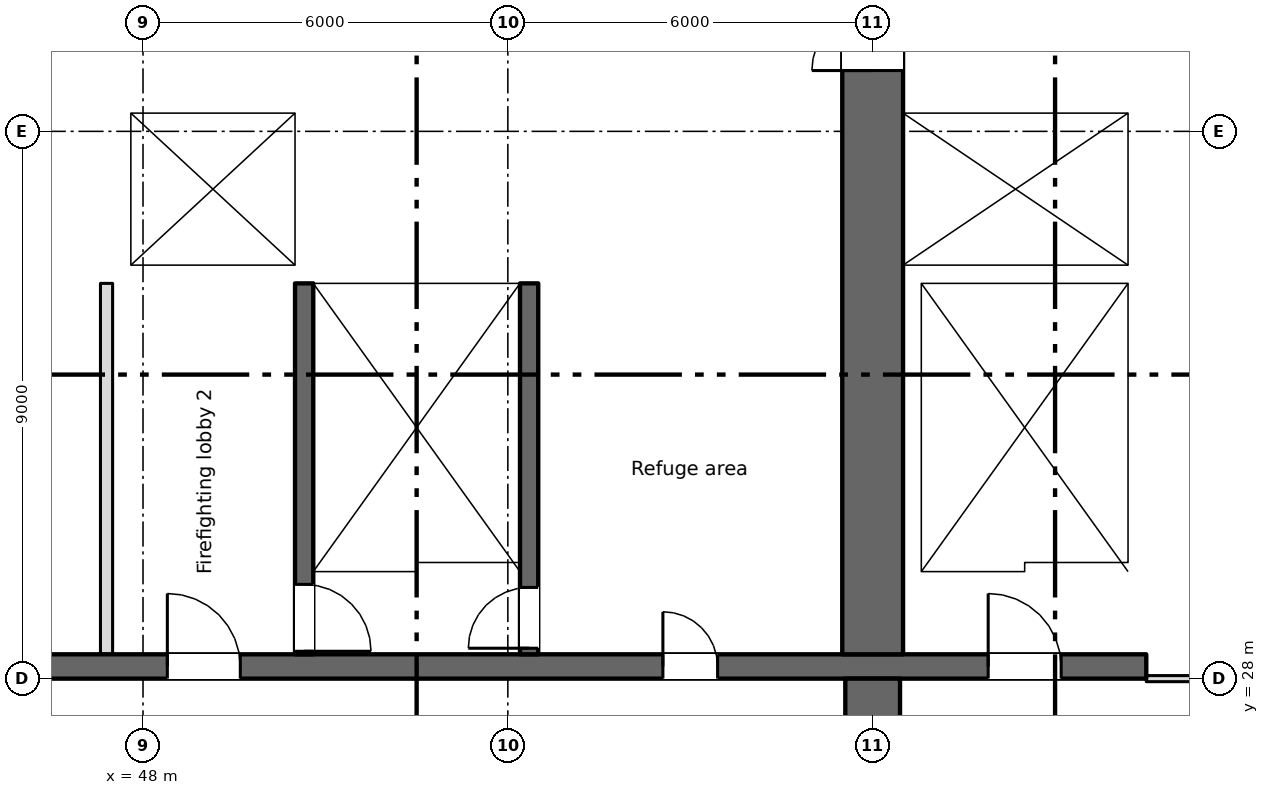
"""IFC4 building model, lengths in metres.
Left out: names, types, materials, properties, quantities, classifications, styles, units other than length and angle.
Written with IfcOpenShell. Run it as: python <this file> out.ifc"""

import sys

from ifc_helpers import new_model, si_unit, direction, frame, frame_2d, origin, place, context, subcontext, project, spatial, rectangle, extrude, element, fill, save


model = new_model("IFC4")
c1 = context("Model", 3, precision=1e-05, world=origin(), true_north=direction((0.0, 1.0)))
c2 = subcontext(c1, "Body", "Model", "MODEL_VIEW")
j1 = project(units=[si_unit("LENGTHUNIT", "METRE"), si_unit("PLANEANGLEUNIT", "RADIAN")], contexts=[c1])
p1 = place(None, origin())
s1 = spatial("IfcSite", under=j1, at=p1, CompositionType="ELEMENT")
p2 = place(p1, origin())
s2 = spatial("IfcBuilding", under=s1, at=p2, CompositionType="ELEMENT")
p3 = place(p2, frame((0.0, 0.0, 90.0)))
s3 = spatial("IfcBuildingStorey", under=s2, at=p3, CompositionType="ELEMENT", Elevation=90.0)
p4 = place(p3, frame((60.0, 1.4, 0.0), z_axis=(0.0, 0.0, 1.0), x_axis=(0.0, 1.0, 0.0)))
e1 = element("IfcWall", 1, at=p4, inside=s3, PredefinedType="SHEAR", context=c2, shape_type="SweptSolid", body=[
    extrude(rectangle(XDim=26.6, YDim=0.9, at=frame_2d((13.3, 0.0))), origin(), (0.0, 0.0, 1.0), 4.2),
])
p5 = place(p4, frame((24.5, 0.0, 0.0)))
e2 = element("IfcOpeningElement", 2, at=p5, cuts=e1, PredefinedType="OPENING", context=c2, shape_type="SweptSolid", body=[
    extrude(rectangle(XDim=1.2, YDim=2.1, at=frame_2d((0.6, 1.05))), frame((0.0, 0.46, 0.0), z_axis=(0.0, -1.0, 0.0), x_axis=(1.0, 0.0, 0.0)), (0.0, 0.0, 1.0), 0.92),
])
p6 = place(p3, frame((6.7, 28.2, 0.0), z_axis=(0.0, 0.0, 1.0), x_axis=(1.0, 0.0, 0.0)))
e3 = element("IfcWall", 3, at=p6, inside=s3, PredefinedType="SHEAR", context=c2, shape_type="SweptSolid", body=[
    extrude(rectangle(XDim=57.8, YDim=0.4, at=frame_2d((28.9, 0.0))), origin(), (0.0, 0.0, 1.0), 4.2),
])
p7 = place(p6, frame((13.85, 0.0, 0.0)))
e4 = element("IfcOpeningElement", 4, at=p7, cuts=e3, PredefinedType="OPENING", context=c2, shape_type="SweptSolid", body=[
    extrude(rectangle(XDim=0.9, YDim=2.1, at=frame_2d((0.45, 1.05))), frame((0.0, 0.21, 0.0), z_axis=(0.0, -1.0, 0.0), x_axis=(1.0, 0.0, 0.0)), (0.0, 0.0, 1.0), 0.42),
])
p8 = place(p6, frame((49.85, 0.0, 0.0)))
e5 = element("IfcOpeningElement", 5, at=p8, cuts=e3, PredefinedType="OPENING", context=c2, shape_type="SweptSolid", body=[
    extrude(rectangle(XDim=0.9, YDim=2.1, at=frame_2d((0.45, 1.05))), frame((0.0, 0.21, 0.0), z_axis=(0.0, -1.0, 0.0), x_axis=(1.0, 0.0, 0.0)), (0.0, 0.0, 1.0), 0.42),
])
p9 = place(p6, frame((1.35, 0.0, 0.0)))
e6 = element("IfcOpeningElement", 6, at=p9, cuts=e3, PredefinedType="OPENING", context=c2, shape_type="SweptSolid", body=[
    extrude(rectangle(XDim=0.9, YDim=2.1, at=frame_2d((0.45, 1.05))), frame((0.0, 0.21, 0.0), z_axis=(0.0, -1.0, 0.0), x_axis=(1.0, 0.0, 0.0)), (0.0, 0.0, 1.0), 0.42),
])
p10 = place(p6, frame((4.7, 0.0, 0.0)))
e7 = element("IfcOpeningElement", 7, at=p10, cuts=e3, PredefinedType="OPENING", context=c2, shape_type="SweptSolid", body=[
    extrude(rectangle(XDim=1.2, YDim=2.1, at=frame_2d((0.6, 1.05))), frame((0.0, 0.21, 0.0), z_axis=(0.0, -1.0, 0.0), x_axis=(1.0, 0.0, 0.0)), (0.0, 0.0, 1.0), 0.42),
])
p11 = place(p6, frame((31.7, 0.0, 0.0)))
e8 = element("IfcOpeningElement", 8, at=p11, cuts=e3, PredefinedType="OPENING", context=c2, shape_type="SweptSolid", body=[
    extrude(rectangle(XDim=1.2, YDim=2.1, at=frame_2d((0.6, 1.05))), frame((0.0, 0.21, 0.0), z_axis=(0.0, -1.0, 0.0), x_axis=(1.0, 0.0, 0.0)), (0.0, 0.0, 1.0), 0.42),
])
p12 = place(p6, frame((55.2, 0.0, 0.0)))
e9 = element("IfcOpeningElement", 9, at=p12, cuts=e3, PredefinedType="OPENING", context=c2, shape_type="SweptSolid", body=[
    extrude(rectangle(XDim=1.2, YDim=2.1, at=frame_2d((0.6, 1.05))), frame((0.0, 0.21, 0.0), z_axis=(0.0, -1.0, 0.0), x_axis=(1.0, 0.0, 0.0)), (0.0, 0.0, 1.0), 0.42),
])
p13 = place(p6, frame((21.7, 0.0, 0.0)))
e10 = element("IfcOpeningElement", 10, at=p13, cuts=e3, PredefinedType="OPENING", context=c2, shape_type="SweptSolid", body=[
    extrude(rectangle(XDim=1.2, YDim=2.1, at=frame_2d((0.6, 1.05))), frame((0.0, 0.21, 0.0), z_axis=(0.0, -1.0, 0.0), x_axis=(1.0, 0.0, 0.0)), (0.0, 0.0, 1.0), 0.42),
])
p14 = place(p6, frame((41.7, 0.0, 0.0)))
e11 = element("IfcOpeningElement", 11, at=p14, cuts=e3, PredefinedType="OPENING", context=c2, shape_type="SweptSolid", body=[
    extrude(rectangle(XDim=1.2, YDim=2.1, at=frame_2d((0.6, 1.05))), frame((0.0, 0.21, 0.0), z_axis=(0.0, -1.0, 0.0), x_axis=(1.0, 0.0, 0.0)), (0.0, 0.0, 1.0), 0.42),
])
p15 = place(p6, frame((24.85, 0.0, 0.0)))
e12 = element("IfcOpeningElement", 12, at=p15, cuts=e3, PredefinedType="OPENING", context=c2, shape_type="SweptSolid", body=[
    extrude(rectangle(XDim=2.4, YDim=2.1, at=frame_2d((1.2, 1.05))), frame((0.0, 0.21, 0.0), z_axis=(0.0, -1.0, 0.0), x_axis=(1.0, 0.0, 0.0)), (0.0, 0.0, 1.0), 0.42),
])
p16 = place(p6, frame((37.35, 0.0, 0.0)))
e13 = element("IfcOpeningElement", 13, at=p16, cuts=e3, PredefinedType="OPENING", context=c2, shape_type="SweptSolid", body=[
    extrude(rectangle(XDim=2.4, YDim=2.1, at=frame_2d((1.2, 1.05))), frame((0.0, 0.21, 0.0), z_axis=(0.0, -1.0, 0.0), x_axis=(1.0, 0.0, 0.0)), (0.0, 0.0, 1.0), 0.42),
])
p17 = place(p6, frame((7.85, 0.0, 0.0)))
e14 = element("IfcOpeningElement", 14, at=p17, cuts=e3, PredefinedType="OPENING", context=c2, shape_type="SweptSolid", body=[
    extrude(rectangle(XDim=2.4, YDim=2.1, at=frame_2d((1.2, 1.05))), frame((0.0, 0.21, 0.0), z_axis=(0.0, -1.0, 0.0), x_axis=(1.0, 0.0, 0.0)), (0.0, 0.0, 1.0), 0.42),
])
p18 = place(p6, frame((28.85, 0.0, 0.0)))
e15 = element("IfcOpeningElement", 15, at=p18, cuts=e3, PredefinedType="OPENING", context=c2, shape_type="SweptSolid", body=[
    extrude(rectangle(XDim=0.9, YDim=2.1, at=frame_2d((0.45, 1.05))), frame((0.0, 0.21, 0.0), z_axis=(0.0, -1.0, 0.0), x_axis=(1.0, 0.0, 0.0)), (0.0, 0.0, 1.0), 0.42),
])
p19 = place(p6, frame((34.85, 0.0, 0.0)))
e16 = element("IfcOpeningElement", 16, at=p19, cuts=e3, PredefinedType="OPENING", context=c2, shape_type="SweptSolid", body=[
    extrude(rectangle(XDim=0.9, YDim=2.1, at=frame_2d((0.45, 1.05))), frame((0.0, 0.21, 0.0), z_axis=(0.0, -1.0, 0.0), x_axis=(1.0, 0.0, 0.0)), (0.0, 0.0, 1.0), 0.42),
])
p20 = place(p3, frame((64.35, 34.8, 0.0), z_axis=(0.0, 0.0, 1.0), x_axis=(0.0, 1.0, 0.0)))
e17 = element("IfcWall", 17, at=p20, inside=s3, PredefinedType="SHEAR", context=c2, shape_type="SweptSolid", body=[
    extrude(rectangle(XDim=10.2, YDim=0.3, at=frame_2d((5.1, 0.0))), origin(), (0.0, 0.0, 1.0), 4.2),
])
p21 = place(p3, frame((60.0, 28.4, 0.0), z_axis=(0.0, 0.0, 1.0), x_axis=(0.0, 1.0, 0.0)))
e18 = element("IfcWall", 18, at=p21, inside=s3, PredefinedType="SHEAR", context=c2, shape_type="SweptSolid", body=[
    extrude(rectangle(XDim=16.6, YDim=1.0, at=frame_2d((8.3, 0.0))), origin(), (0.0, 0.0, 1.0), 4.2),
])
p22 = place(p21, frame((9.6, 0.0, 0.0)))
e19 = element("IfcOpeningElement", 19, at=p22, cuts=e18, PredefinedType="OPENING", context=c2, shape_type="SweptSolid", body=[
    extrude(rectangle(XDim=2.0, YDim=2.1, at=frame_2d((1.0, 1.05))), frame((0.0, 0.51, 0.0), z_axis=(0.0, -1.0, 0.0), x_axis=(1.0, 0.0, 0.0)), (0.0, 0.0, 1.0), 1.02),
])
p23 = place(p21, frame((15.25, 0.0, 0.0)))
e20 = element("IfcOpeningElement", 20, at=p23, cuts=e18, PredefinedType="OPENING", context=c2, shape_type="SweptSolid", body=[
    extrude(rectangle(XDim=1.2, YDim=2.1, at=frame_2d((0.6, 1.05))), frame((0.0, 0.51, 0.0), z_axis=(0.0, -1.0, 0.0), x_axis=(1.0, 0.0, 0.0)), (0.0, 0.0, 1.0), 1.02),
])
p24 = place(p3, frame((50.65, 34.5, 0.0), z_axis=(0.0, 0.0, 1.0), x_axis=(0.0, -1.0, 0.0)))
e21 = element("IfcWall", 21, at=p24, inside=s3, PredefinedType="SHEAR", context=c2, shape_type="SweptSolid", body=[
    extrude(rectangle(XDim=6.1, YDim=0.3, at=frame_2d((3.05, 0.0))), origin(), (0.0, 0.0, 1.0), 4.2),
])
p25 = place(p24, frame((4.95, 0.0, 0.0)))
e22 = element("IfcOpeningElement", 22, at=p25, cuts=e21, PredefinedType="OPENING", context=c2, shape_type="SweptSolid", body=[
    extrude(rectangle(XDim=1.1, YDim=2.1, at=frame_2d((0.55, 1.05))), frame((0.0, 0.16, 0.0), z_axis=(0.0, -1.0, 0.0), x_axis=(1.0, 0.0, 0.0)), (0.0, 0.0, 1.0), 0.32),
])
p26 = place(p3, frame((54.35, 28.4, 0.0), z_axis=(0.0, 0.0, 1.0), x_axis=(0.0, 1.0, 0.0)))
e23 = element("IfcWall", 23, at=p26, inside=s3, PredefinedType="SHEAR", context=c2, shape_type="SweptSolid", body=[
    extrude(rectangle(XDim=6.1, YDim=0.3, at=frame_2d((3.05, 0.0))), origin(), (0.0, 0.0, 1.0), 4.2),
])
p27 = place(p26, frame((0.1, 0.0, 0.0)))
e24 = element("IfcOpeningElement", 24, at=p27, cuts=e23, PredefinedType="OPENING", context=c2, shape_type="SweptSolid", body=[
    extrude(rectangle(XDim=1.0, YDim=2.1, at=frame_2d((0.5, 1.05))), frame((0.0, 0.16, 0.0), z_axis=(0.0, -1.0, 0.0), x_axis=(1.0, 0.0, 0.0)), (0.0, 0.0, 1.0), 0.32),
])
for number, where, z_axis, x_axis in (
    (25, (60.65, 28.4, 0.0), (0.0, 0.0, 1.0), (0.0, 1.0, 0.0)),
    (26, (64.35, 28.4, 0.0), (0.0, 0.0, 1.0), (0.0, 1.0, 0.0)),
):
    element("IfcWall", number, at=place(p3, frame(where, z_axis=z_axis, x_axis=x_axis)), inside=s3, PredefinedType="SHEAR", context=c2, shape_type="SweptSolid", body=[
        extrude(rectangle(XDim=6.1, YDim=0.3, at=frame_2d((3.05, 0.0))), origin(), (0.0, 0.0, 1.0), 4.2),
    ])
p28 = place(p3, frame((47.3, 34.65, 0.0), z_axis=(0.0, 0.0, 1.0), x_axis=(1.0, 0.0, 0.0)))
e27 = element("IfcWall", 27, at=p28, inside=s3, PredefinedType="SHEAR", context=c2, shape_type="SweptSolid", body=[
    extrude(rectangle(XDim=12.2, YDim=0.3, at=frame_2d((6.1, 0.0))), origin(), (0.0, 0.0, 1.0), 4.2),
])
p29 = place(p28, frame((1.3, 0.0, 0.0)))
e28 = element("IfcOpeningElement", 28, at=p29, cuts=e27, PredefinedType="OPENING", context=c2, shape_type="SweptSolid", body=[
    extrude(rectangle(XDim=1.1, YDim=2.1, at=frame_2d((0.55, 1.05))), frame((0.0, 0.16, 0.0), z_axis=(0.0, -1.0, 0.0), x_axis=(1.0, 0.0, 0.0)), (0.0, 0.0, 1.0), 0.32),
])
p30 = place(p3, frame((60.5, 34.65, 0.0), z_axis=(0.0, 0.0, 1.0), x_axis=(1.0, 0.0, 0.0)))
e29 = element("IfcWall", 29, at=p30, inside=s3, PredefinedType="SHEAR", context=c2, shape_type="SweptSolid", body=[
    extrude(rectangle(XDim=4.0, YDim=0.3, at=frame_2d((2.0, 0.0))), origin(), (0.0, 0.0, 1.0), 4.2),
])
p31 = place(p3, frame((47.3, 37.45, 0.0), z_axis=(0.0, 0.0, 1.0), x_axis=(1.0, 0.0, 0.0)))
e30 = element("IfcWall", 30, at=p31, inside=s3, PredefinedType="SHEAR", context=c2, shape_type="SweptSolid", body=[
    extrude(rectangle(XDim=12.2, YDim=0.3, at=frame_2d((6.1, 0.0))), origin(), (0.0, 0.0, 1.0), 4.2),
])
p32 = place(p31, frame((4.3, 0.0, 0.0)))
e31 = element("IfcOpeningElement", 31, at=p32, cuts=e30, PredefinedType="OPENING", context=c2, shape_type="SweptSolid", body=[
    extrude(rectangle(XDim=1.1, YDim=2.1, at=frame_2d((0.55, 1.05))), frame((0.0, 0.16, 0.0), z_axis=(0.0, -1.0, 0.0), x_axis=(1.0, 0.0, 0.0)), (0.0, 0.0, 1.0), 0.32),
])
p33 = place(p31, frame((7.3, 0.0, 0.0)))
e32 = element("IfcOpeningElement", 32, at=p33, cuts=e30, PredefinedType="OPENING", context=c2, shape_type="SweptSolid", body=[
    extrude(rectangle(XDim=1.1, YDim=2.1, at=frame_2d((0.55, 1.05))), frame((0.0, 0.16, 0.0), z_axis=(0.0, -1.0, 0.0), x_axis=(1.0, 0.0, 0.0)), (0.0, 0.0, 1.0), 0.32),
])
p34 = place(p31, frame((10.3, 0.0, 0.0)))
e33 = element("IfcOpeningElement", 33, at=p34, cuts=e30, PredefinedType="OPENING", context=c2, shape_type="SweptSolid", body=[
    extrude(rectangle(XDim=1.1, YDim=2.1, at=frame_2d((0.55, 1.05))), frame((0.0, 0.16, 0.0), z_axis=(0.0, -1.0, 0.0), x_axis=(1.0, 0.0, 0.0)), (0.0, 0.0, 1.0), 0.32),
])
p35 = place(p3, frame((60.5, 37.45, 0.0), z_axis=(0.0, 0.0, 1.0), x_axis=(1.0, 0.0, 0.0)))
e34 = element("IfcWall", 34, at=p35, inside=s3, PredefinedType="SHEAR", context=c2, shape_type="SweptSolid", body=[
    extrude(rectangle(XDim=3.7, YDim=0.3, at=frame_2d((1.85, 0.0))), origin(), (0.0, 0.0, 1.0), 4.2),
])
p36 = place(p35, frame((1.3, 0.0, 0.0)))
e35 = element("IfcOpeningElement", 35, at=p36, cuts=e34, PredefinedType="OPENING", context=c2, shape_type="SweptSolid", body=[
    extrude(rectangle(XDim=1.1, YDim=2.1, at=frame_2d((0.55, 1.05))), frame((0.0, 0.16, 0.0), z_axis=(0.0, -1.0, 0.0), x_axis=(1.0, 0.0, 0.0)), (0.0, 0.0, 1.0), 0.32),
])
p37 = place(p3, frame((47.55, 34.8, 0.0), z_axis=(0.0, 0.0, 1.0), x_axis=(0.0, 1.0, 0.0)))
e36 = element("IfcWall", 36, at=p37, inside=s3, PredefinedType="SHEAR", context=c2, shape_type="SweptSolid", body=[
    extrude(rectangle(XDim=2.5, YDim=0.5, at=frame_2d((1.25, 0.0))), origin(), (0.0, 0.0, 1.0), 4.2),
])
for number, where, z_axis, x_axis in (
    (37, (50.65, 34.8, 0.0), (0.0, 0.0, 1.0), (0.0, 1.0, 0.0)),
    (38, (53.65, 34.8, 0.0), (0.0, 0.0, 1.0), (0.0, 1.0, 0.0)),
    (39, (56.65, 34.8, 0.0), (0.0, 0.0, 1.0), (0.0, 1.0, 0.0)),
):
    element("IfcWall", number, at=place(p3, frame(where, z_axis=z_axis, x_axis=x_axis)), inside=s3, PredefinedType="SHEAR", context=c2, shape_type="SweptSolid", body=[
        extrude(rectangle(XDim=2.5, YDim=0.3, at=frame_2d((1.25, 0.0))), origin(), (0.0, 0.0, 1.0), 4.2),
    ])
p38 = place(p3, frame((47.4, 28.4, 0.0), z_axis=(0.0, 0.0, 1.0), x_axis=(0.0, 1.0, 0.0)))
e40 = element("IfcWall", 40, at=p38, inside=s3, PredefinedType="PARTITIONING", context=c2, shape_type="SweptSolid", body=[
    extrude(rectangle(XDim=6.1, YDim=0.2, at=frame_2d((3.05, 0.0))), origin(), (0.0, 0.0, 1.0), 4.2),
])
p39 = place(p3, frame((64.5, 28.0, 0.0), z_axis=(0.0, 0.0, 1.0), x_axis=(1.0, 0.0, 0.0)))
e41 = element("IfcWall", 41, at=p39, inside=s3, PredefinedType="PARTITIONING", context=c2, shape_type="SweptSolid", body=[
    extrude(rectangle(XDim=12.7, YDim=0.1, at=frame_2d((6.35, 0.0))), origin(), (0.0, 0.0, 1.0), 4.2),
])
p40 = place(p39, frame((2.675, 0.0, 0.0)))
e42 = element("IfcOpeningElement", 42, at=p40, cuts=e41, PredefinedType="OPENING", context=c2, shape_type="SweptSolid", body=[
    extrude(rectangle(XDim=1.0, YDim=2.1, at=frame_2d((0.5, 1.05))), frame((0.0, 0.06, 0.0), z_axis=(0.0, -1.0, 0.0), x_axis=(1.0, 0.0, 0.0)), (0.0, 0.0, 1.0), 0.12),
])
p41 = place(p39, frame((9.025, 0.0, 0.0)))
e43 = element("IfcOpeningElement", 43, at=p41, cuts=e41, PredefinedType="OPENING", context=c2, shape_type="SweptSolid", body=[
    extrude(rectangle(XDim=1.0, YDim=2.1, at=frame_2d((0.5, 1.05))), frame((0.0, 0.06, 0.0), z_axis=(0.0, -1.0, 0.0), x_axis=(1.0, 0.0, 0.0)), (0.0, 0.0, 1.0), 0.12),
])
p42 = place(p8, origin())
e44 = element("IfcDoor", 44, at=p42, inside=s3, OperationType="SINGLE_SWING_LEFT", PredefinedType="DOOR", context=c2, shape_type="SweptSolid", body=[
    extrude(rectangle(XDim=0.9, YDim=2.1, at=frame_2d((0.45, 1.05))), frame((0.0, 0.025, 0.0), z_axis=(0.0, -1.0, 0.0), x_axis=(1.0, 0.0, 0.0)), (0.0, 0.0, 1.0), 0.05),
])
fill(e5, e44)
p43 = place(p27, origin())
e45 = element("IfcDoor", 45, at=p43, inside=s3, OperationType="SINGLE_SWING_LEFT", PredefinedType="DOOR", context=c2, shape_type="SweptSolid", body=[
    extrude(rectangle(XDim=1.0, YDim=2.1, at=frame_2d((0.5, 1.05))), frame((0.0, 0.025, 0.0), z_axis=(0.0, -1.0, 0.0), x_axis=(1.0, 0.0, 0.0)), (0.0, 0.0, 1.0), 0.05),
])
fill(e24, e45)
p44 = place(p32, origin())
e46 = element("IfcDoor", 46, at=p44, inside=s3, OperationType="SLIDING_TO_LEFT", PredefinedType="DOOR", context=c2, shape_type="SweptSolid", body=[
    extrude(rectangle(XDim=1.1, YDim=2.1, at=frame_2d((0.55, 1.05))), frame((0.0, 0.025, 0.0), z_axis=(0.0, -1.0, 0.0), x_axis=(1.0, 0.0, 0.0)), (0.0, 0.0, 1.0), 0.05),
])
fill(e31, e46)
p45 = place(p33, origin())
e47 = element("IfcDoor", 47, at=p45, inside=s3, OperationType="SLIDING_TO_LEFT", PredefinedType="DOOR", context=c2, shape_type="SweptSolid", body=[
    extrude(rectangle(XDim=1.1, YDim=2.1, at=frame_2d((0.55, 1.05))), frame((0.0, 0.025, 0.0), z_axis=(0.0, -1.0, 0.0), x_axis=(1.0, 0.0, 0.0)), (0.0, 0.0, 1.0), 0.05),
])
fill(e32, e47)
p46 = place(p34, origin())
e48 = element("IfcDoor", 48, at=p46, inside=s3, OperationType="SLIDING_TO_LEFT", PredefinedType="DOOR", context=c2, shape_type="SweptSolid", body=[
    extrude(rectangle(XDim=1.1, YDim=2.1, at=frame_2d((0.55, 1.05))), frame((0.0, 0.025, 0.0), z_axis=(0.0, -1.0, 0.0), x_axis=(1.0, 0.0, 0.0)), (0.0, 0.0, 1.0), 0.05),
])
fill(e33, e48)
p47 = place(p36, origin())
e49 = element("IfcDoor", 49, at=p47, inside=s3, OperationType="SLIDING_TO_LEFT", PredefinedType="DOOR", context=c2, shape_type="SweptSolid", body=[
    extrude(rectangle(XDim=1.1, YDim=2.1, at=frame_2d((0.55, 1.05))), frame((0.0, 0.025, 0.0), z_axis=(0.0, -1.0, 0.0), x_axis=(1.0, 0.0, 0.0)), (0.0, 0.0, 1.0), 0.05),
])
fill(e35, e49)
p48 = place(p29, origin())
e50 = element("IfcDoor", 50, at=p48, inside=s3, OperationType="SLIDING_TO_LEFT", PredefinedType="DOOR", context=c2, shape_type="SweptSolid", body=[
    extrude(rectangle(XDim=1.1, YDim=2.1, at=frame_2d((0.55, 1.05))), frame((0.0, 0.025, 0.0), z_axis=(0.0, -1.0, 0.0), x_axis=(1.0, 0.0, 0.0)), (0.0, 0.0, 1.0), 0.05),
])
fill(e28, e50)
p49 = place(p25, origin())
e51 = element("IfcDoor", 51, at=p49, inside=s3, OperationType="SINGLE_SWING_RIGHT", PredefinedType="DOOR", context=c2, shape_type="SweptSolid", body=[
    extrude(rectangle(XDim=1.1, YDim=2.1, at=frame_2d((0.55, 1.05))), frame((0.0, 0.025, 0.0), z_axis=(0.0, -1.0, 0.0), x_axis=(1.0, 0.0, 0.0)), (0.0, 0.0, 1.0), 0.05),
])
fill(e22, e51)
p50 = place(p12, origin())
e52 = element("IfcDoor", 52, at=p50, inside=s3, OperationType="SINGLE_SWING_LEFT", PredefinedType="DOOR", context=c2, shape_type="SweptSolid", body=[
    extrude(rectangle(XDim=1.2, YDim=2.1, at=frame_2d((0.6, 1.05))), frame((0.0, 0.025, 0.0), z_axis=(0.0, -1.0, 0.0), x_axis=(1.0, 0.0, 0.0)), (0.0, 0.0, 1.0), 0.05),
])
fill(e9, e52)
p51 = place(p14, origin())
e53 = element("IfcDoor", 53, at=p51, inside=s3, OperationType="SINGLE_SWING_LEFT", PredefinedType="DOOR", context=c2, shape_type="SweptSolid", body=[
    extrude(rectangle(XDim=1.2, YDim=2.1, at=frame_2d((0.6, 1.05))), frame((0.0, 0.025, 0.0), z_axis=(0.0, -1.0, 0.0), x_axis=(1.0, 0.0, 0.0)), (0.0, 0.0, 1.0), 0.05),
])
fill(e11, e53)
p52 = place(p22, origin())
e54 = element("IfcDoor", 54, at=p52, inside=s3, OperationType="DOUBLE_DOOR_SINGLE_SWING", PredefinedType="DOOR", context=c2, shape_type="SweptSolid", body=[
    extrude(rectangle(XDim=2.0, YDim=2.1, at=frame_2d((1.0, 1.05))), frame((0.0, 0.025, 0.0), z_axis=(0.0, -1.0, 0.0), x_axis=(1.0, 0.0, 0.0)), (0.0, 0.0, 1.0), 0.05),
])
fill(e19, e54)
save(model, sys.argv[1])
